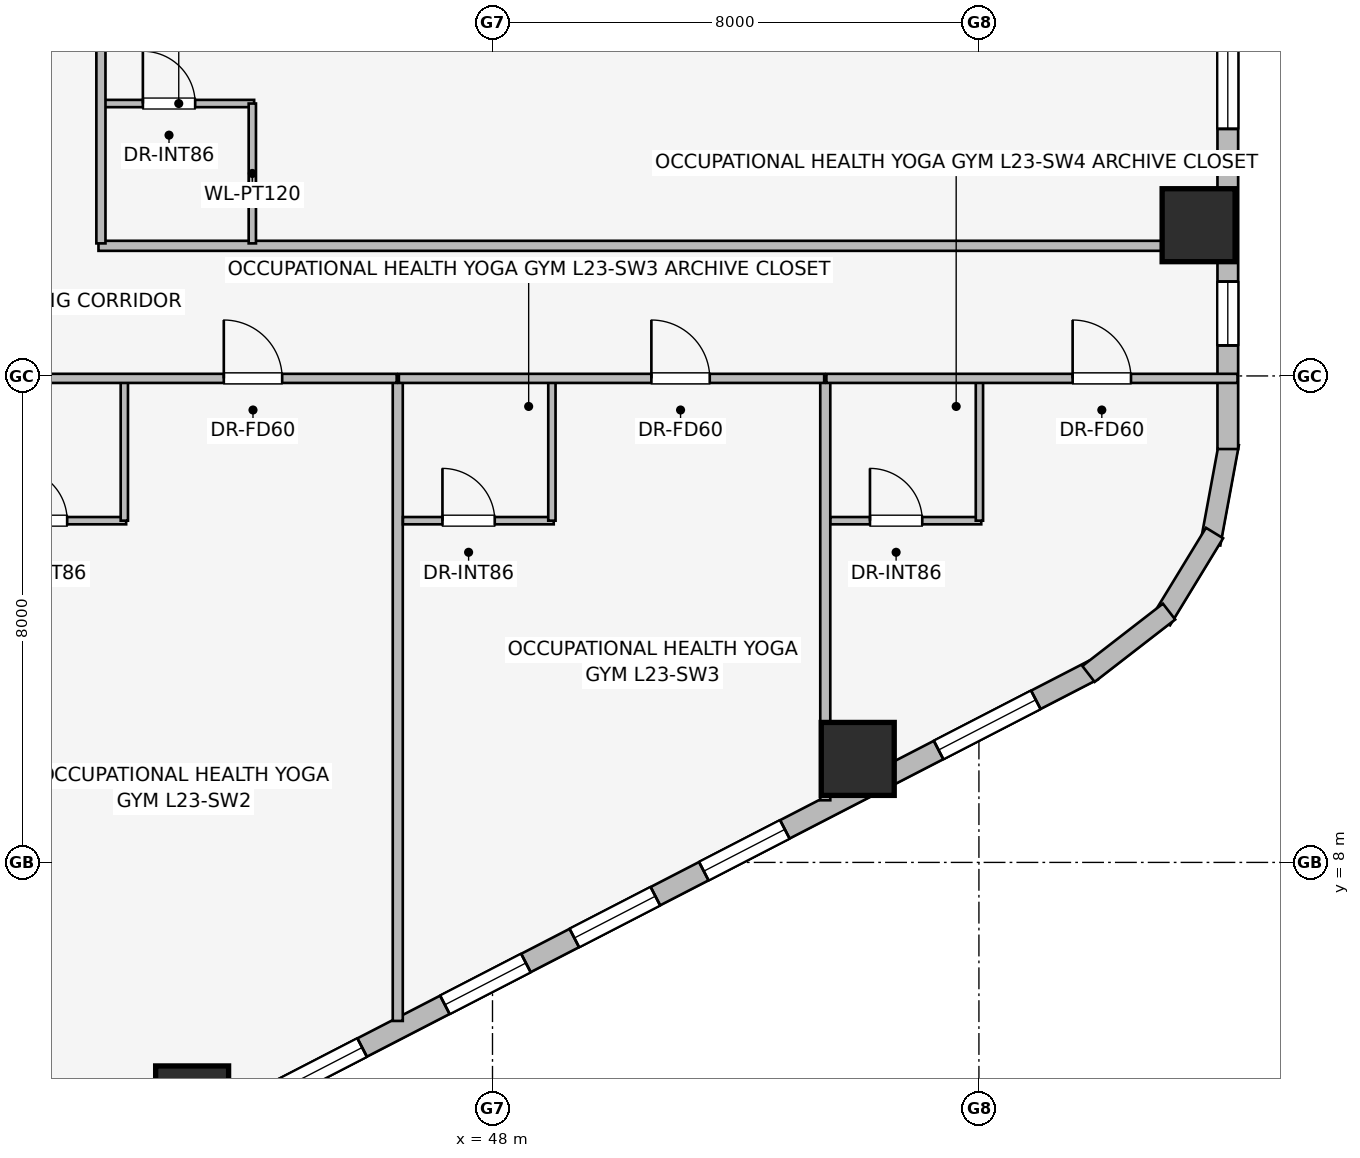
"""IFC4 building model, lengths in metres.
Left out: names, types, materials, properties, quantities, classifications, styles, units other than length and angle.
Written with IfcOpenShell. Run it as: python <this file> out.ifc"""

import sys

from ifc_helpers import new_model, si_unit, direction, frame, frame_2d, origin, origin_2d, place, context, subcontext, project, spatial, rectangle, extrude, element, fill, save


model = new_model("IFC4")
c1 = context("Model", 3, precision=1e-05, world=origin(), true_north=direction((0.0, 1.0)))
c2 = subcontext(c1, "Body", "Model", "MODEL_VIEW")
j1 = project(units=[si_unit("LENGTHUNIT", "METRE"), si_unit("PLANEANGLEUNIT", "RADIAN")], contexts=[c1])
p1 = place(None, origin())
s1 = spatial("IfcSite", under=j1, at=p1, CompositionType="ELEMENT")
p2 = place(p1, origin())
s2 = spatial("IfcBuilding", under=s1, at=p2, CompositionType="ELEMENT")
p3 = place(p2, frame((0.0, 0.0, 89.05)))
s3 = spatial("IfcBuildingStorey", under=s2, at=p3, CompositionType="ELEMENT", Elevation=89.05)
for number, where, z_axis, x_axis in (
    (1, (43.06, 4.053, 0.0), (0.0, 0.0, 1.0), (1.0, 0.0, 0.0)),
    (2, (54.007, 9.702, 0.0), (0.0, 0.0, 1.0), (1.0, 0.0, 0.0)),
    (3, (59.613, 18.479, 0.0), (0.0, 0.0, 1.0), (1.0, 0.0, 0.0)),
):
    element("IfcColumn", number, at=place(p3, frame(where, z_axis=z_axis, x_axis=x_axis)), inside=s3, PredefinedType="COLUMN", context=c2, shape_type="SweptSolid", body=[
        extrude(rectangle(XDim=1.2, YDim=1.2, at=origin_2d()), origin(), (0.0, 0.0, 1.0), 3.65),
    ])
p4 = place(p3, frame((57.876, 11.159, 0.0), z_axis=(0.0, 0.0, 1.0), x_axis=(-0.888634413993, -0.458616264721, 0.0)))
e4 = element("IfcWall", 4, at=p4, inside=s3, PredefinedType="STANDARD", context=c2, shape_type="SweptSolid", body=[
    extrude(rectangle(XDim=20.531, YDim=0.34, at=frame_2d((10.266, 0.0))), origin(), (0.0, 0.0, 1.0), 2.684),
])
p5 = place(p4, frame((1.058, 0.0, 0.75)))
e5 = element("IfcOpeningElement", 5, at=p5, cuts=e4, PredefinedType="OPENING", context=c2, shape_type="SweptSolid", body=[
    extrude(rectangle(XDim=1.8, YDim=1.5, at=frame_2d((0.9, 0.75))), frame((0.0, 0.18, 0.0), z_axis=(0.0, -1.0, 0.0), x_axis=(1.0, 0.0, 0.0)), (0.0, 0.0, 1.0), 0.36),
])
p6 = place(p4, frame((5.703, 0.0, 0.75)))
e6 = element("IfcOpeningElement", 6, at=p6, cuts=e4, PredefinedType="OPENING", context=c2, shape_type="SweptSolid", body=[
    extrude(rectangle(XDim=1.5, YDim=1.5, at=frame_2d((0.75, 0.75))), frame((0.0, 0.18, 0.0), z_axis=(0.0, -1.0, 0.0), x_axis=(1.0, 0.0, 0.0)), (0.0, 0.0, 1.0), 0.36),
])
p7 = place(p4, frame((8.099, 0.0, 0.75)))
e7 = element("IfcOpeningElement", 7, at=p7, cuts=e4, PredefinedType="OPENING", context=c2, shape_type="SweptSolid", body=[
    extrude(rectangle(XDim=1.5, YDim=1.5, at=frame_2d((0.75, 0.75))), frame((0.0, 0.18, 0.0), z_axis=(0.0, -1.0, 0.0), x_axis=(1.0, 0.0, 0.0)), (0.0, 0.0, 1.0), 0.36),
])
p8 = place(p4, frame((10.495, 0.0, 0.75)))
e8 = element("IfcOpeningElement", 8, at=p8, cuts=e4, PredefinedType="OPENING", context=c2, shape_type="SweptSolid", body=[
    extrude(rectangle(XDim=1.5, YDim=1.5, at=frame_2d((0.75, 0.75))), frame((0.0, 0.18, 0.0), z_axis=(0.0, -1.0, 0.0), x_axis=(1.0, 0.0, 0.0)), (0.0, 0.0, 1.0), 0.36),
])
p9 = place(p4, frame((13.526, 0.0, 0.75)))
e9 = element("IfcOpeningElement", 9, at=p9, cuts=e4, PredefinedType="OPENING", context=c2, shape_type="SweptSolid", body=[
    extrude(rectangle(XDim=1.8, YDim=1.5, at=frame_2d((0.9, 0.75))), frame((0.0, 0.18, 0.0), z_axis=(0.0, -1.0, 0.0), x_axis=(1.0, 0.0, 0.0)), (0.0, 0.0, 1.0), 0.36),
])
p10 = place(p4, frame((17.823, 0.0, 0.75)))
e10 = element("IfcOpeningElement", 10, at=p10, cuts=e4, PredefinedType="OPENING", context=c2, shape_type="SweptSolid", body=[
    extrude(rectangle(XDim=1.5, YDim=1.5, at=frame_2d((0.75, 0.75))), frame((0.0, 0.18, 0.0), z_axis=(0.0, -1.0, 0.0), x_axis=(1.0, 0.0, 0.0)), (0.0, 0.0, 1.0), 0.36),
])
p11 = place(p3, frame((60.113, 14.892, 0.0), z_axis=(0.0, 0.0, 1.0), x_axis=(-0.181714143354, -0.983351397063, 0.0)))
e11 = element("IfcWall", 11, at=p11, inside=s3, PredefinedType="STANDARD", context=c2, shape_type="SweptSolid", body=[
    extrude(rectangle(XDim=1.678, YDim=0.33, at=frame_2d((0.839, 0.0))), origin(), (0.0, 0.0, 1.0), 3.39),
])
p12 = place(p3, frame((59.875, 13.417, 0.0), z_axis=(0.0, 0.0, 1.0), x_axis=(-0.520584129191, -0.853810379671, 0.0)))
e12 = element("IfcWall", 12, at=p12, inside=s3, PredefinedType="STANDARD", context=c2, shape_type="SweptSolid", body=[
    extrude(rectangle(XDim=1.677, YDim=0.33, at=frame_2d((0.838, 0.0))), origin(), (0.0, 0.0, 1.0), 3.39),
])
p13 = place(p3, frame((59.127, 12.125, 0.0), z_axis=(0.0, 0.0, 1.0), x_axis=(-0.790691856293, -0.61221433207, 0.0)))
e13 = element("IfcWall", 13, at=p13, inside=s3, PredefinedType="STANDARD", context=c2, shape_type="SweptSolid", body=[
    extrude(rectangle(XDim=1.676, YDim=0.33, at=frame_2d((0.838, 0.0))), origin(), (0.0, 0.0, 1.0), 3.39),
])
p14 = place(p3, frame((60.093, 33.202, 0.0), z_axis=(0.0, 0.0, 1.0), x_axis=(0.0, -1.0, 0.0)))
e14 = element("IfcWall", 14, at=p14, inside=s3, PredefinedType="STANDARD", context=c2, shape_type="SweptSolid", body=[
    extrude(rectangle(XDim=18.404, YDim=0.34, at=frame_2d((9.202, 0.0))), origin(), (0.0, 0.0, 1.0), 2.684),
])
p15 = place(p14, frame((1.744, 0.0, 0.75)))
e15 = element("IfcOpeningElement", 15, at=p15, cuts=e14, PredefinedType="OPENING", context=c2, shape_type="SweptSolid", body=[
    extrude(rectangle(XDim=1.05, YDim=1.4, at=frame_2d((0.525, 0.7))), frame((0.0, 0.18, 0.0), z_axis=(0.0, -1.0, 0.0), x_axis=(1.0, 0.0, 0.0)), (0.0, 0.0, 1.0), 0.36),
])
p16 = place(p14, frame((5.265, 0.0, 0.75)))
e16 = element("IfcOpeningElement", 16, at=p16, cuts=e14, PredefinedType="OPENING", context=c2, shape_type="SweptSolid", body=[
    extrude(rectangle(XDim=1.5, YDim=1.5, at=frame_2d((0.75, 0.75))), frame((0.0, 0.18, 0.0), z_axis=(0.0, -1.0, 0.0), x_axis=(1.0, 0.0, 0.0)), (0.0, 0.0, 1.0), 0.36),
])
p17 = place(p14, frame((8.452, 0.0, 0.75)))
e17 = element("IfcOpeningElement", 17, at=p17, cuts=e14, PredefinedType="OPENING", context=c2, shape_type="SweptSolid", body=[
    extrude(rectangle(XDim=1.5, YDim=1.5, at=frame_2d((0.75, 0.75))), frame((0.0, 0.18, 0.0), z_axis=(0.0, -1.0, 0.0), x_axis=(1.0, 0.0, 0.0)), (0.0, 0.0, 1.0), 0.36),
])
p18 = place(p14, frame((11.639, 0.0, 0.75)))
e18 = element("IfcOpeningElement", 18, at=p18, cuts=e14, PredefinedType="OPENING", context=c2, shape_type="SweptSolid", body=[
    extrude(rectangle(XDim=1.5, YDim=1.5, at=frame_2d((0.75, 0.75))), frame((0.0, 0.18, 0.0), z_axis=(0.0, -1.0, 0.0), x_axis=(1.0, 0.0, 0.0)), (0.0, 0.0, 1.0), 0.36),
])
p19 = place(p14, frame((15.65, 0.0, 0.75)))
e19 = element("IfcOpeningElement", 19, at=p19, cuts=e14, PredefinedType="OPENING", context=c2, shape_type="SweptSolid", body=[
    extrude(rectangle(XDim=1.05, YDim=1.4, at=frame_2d((0.525, 0.7))), frame((0.0, 0.18, 0.0), z_axis=(0.0, -1.0, 0.0), x_axis=(1.0, 0.0, 0.0)), (0.0, 0.0, 1.0), 0.36),
])
p20 = place(p3, frame((41.52, 18.14, 0.0), z_axis=(0.0, 0.0, 1.0), x_axis=(1.0, 0.0, 0.0)))
e20 = element("IfcWall", 20, at=p20, inside=s3, PredefinedType="PARTITIONING", context=c2, shape_type="SweptSolid", body=[
    extrude(rectangle(XDim=18.453, YDim=0.165, at=frame_2d((9.227, 0.0))), origin(), (0.0, 0.0, 1.0), 3.39),
])
p21 = place(p3, frame((41.6, 20.48, 0.0), z_axis=(0.0, 0.0, 1.0), x_axis=(1.0, 0.0, 0.0)))
e21 = element("IfcWall", 21, at=p21, inside=s3, PredefinedType="PARTITIONING", context=c2, shape_type="SweptSolid", body=[
    extrude(rectangle(XDim=2.48, YDim=0.12, at=frame_2d((1.24, 0.0))), origin(), (0.0, 0.0, 1.0), 3.39),
])
p22 = place(p21, frame((0.65, 0.0, 0.0)))
e22 = element("IfcOpeningElement", 22, at=p22, cuts=e21, PredefinedType="OPENING", context=c2, shape_type="SweptSolid", body=[
    extrude(rectangle(XDim=0.86, YDim=2.0, at=frame_2d((0.43, 1.0))), frame((0.0, 0.07, 0.0), z_axis=(0.0, -1.0, 0.0), x_axis=(1.0, 0.0, 0.0)), (0.0, 0.0, 1.0), 0.14),
])
p23 = place(p3, frame((44.05, 18.18, 0.0), z_axis=(0.0, 0.0, 1.0), x_axis=(0.0, 1.0, 0.0)))
e23 = element("IfcWall", 23, at=p23, inside=s3, PredefinedType="PARTITIONING", context=c2, shape_type="SweptSolid", body=[
    extrude(rectangle(XDim=2.3, YDim=0.12, at=frame_2d((1.15, 0.0))), origin(), (0.0, 0.0, 1.0), 3.39),
])
p24 = place(p3, frame((41.56, 18.18, 0.0), z_axis=(0.0, 0.0, 1.0), x_axis=(0.0, 1.0, 0.0)))
e24 = element("IfcWall", 24, at=p24, inside=s3, PredefinedType="PARTITIONING", context=c2, shape_type="SweptSolid", body=[
    extrude(rectangle(XDim=11.64, YDim=0.15, at=frame_2d((5.82, 0.0))), origin(), (0.0, 0.0, 1.0), 3.39),
])
p25 = place(p24, frame((6.615, 0.0, 0.0)))
e25 = element("IfcOpeningElement", 25, at=p25, cuts=e24, PredefinedType="OPENING", context=c2, shape_type="SweptSolid", body=[
    extrude(rectangle(XDim=0.96, YDim=2.0, at=frame_2d((0.48, 1.0))), frame((0.0, 0.085, 0.0), z_axis=(0.0, -1.0, 0.0), x_axis=(1.0, 0.0, 0.0)), (0.0, 0.0, 1.0), 0.17),
])
p26 = place(p3, frame((46.442, 5.393, 0.0), z_axis=(0.0, 0.0, 1.0), x_axis=(0.0, 1.0, 0.0)))
e26 = element("IfcWall", 26, at=p26, inside=s3, PredefinedType="PARTITIONING", context=c2, shape_type="SweptSolid", body=[
    extrude(rectangle(XDim=10.537, YDim=0.165, at=frame_2d((5.269, 0.0))), origin(), (0.0, 0.0, 1.0), 3.39),
])
p27 = place(p3, frame((53.473, 9.022, 0.0), z_axis=(0.0, 0.0, 1.0), x_axis=(0.0, 1.0, 0.0)))
e27 = element("IfcWall", 27, at=p27, inside=s3, PredefinedType="PARTITIONING", context=c2, shape_type="SweptSolid", body=[
    extrude(rectangle(XDim=6.908, YDim=0.165, at=frame_2d((3.454, 0.0))), origin(), (0.0, 0.0, 1.0), 3.39),
])
p28 = place(p3, frame((39.495, 13.62, 0.0), z_axis=(0.0, 0.0, 1.0), x_axis=(1.0, 0.0, 0.0)))
e28 = element("IfcWall", 28, at=p28, inside=s3, PredefinedType="PARTITIONING", context=c2, shape_type="SweptSolid", body=[
    extrude(rectangle(XDim=2.48, YDim=0.12, at=frame_2d((1.24, 0.0))), origin(), (0.0, 0.0, 1.0), 3.39),
])
p29 = place(p28, frame((0.65, 0.0, 0.0)))
e29 = element("IfcOpeningElement", 29, at=p29, cuts=e28, PredefinedType="OPENING", context=c2, shape_type="SweptSolid", body=[
    extrude(rectangle(XDim=0.86, YDim=2.0, at=frame_2d((0.43, 1.0))), frame((0.0, 0.07, 0.0), z_axis=(0.0, -1.0, 0.0), x_axis=(1.0, 0.0, 0.0)), (0.0, 0.0, 1.0), 0.14),
])
p30 = place(p3, frame((41.945, 13.62, 0.0), z_axis=(0.0, 0.0, 1.0), x_axis=(0.0, 1.0, 0.0)))
e30 = element("IfcWall", 30, at=p30, inside=s3, PredefinedType="PARTITIONING", context=c2, shape_type="SweptSolid", body=[
    extrude(rectangle(XDim=2.3, YDim=0.12, at=frame_2d((1.15, 0.0))), origin(), (0.0, 0.0, 1.0), 3.39),
])
p31 = place(p3, frame((39.428, 15.96, 0.0), z_axis=(0.0, 0.0, 1.0), x_axis=(1.0, 0.0, 0.0)))
e31 = element("IfcWall", 31, at=p31, inside=s3, PredefinedType="PARTITIONING", context=c2, shape_type="SweptSolid", body=[
    extrude(rectangle(XDim=6.996, YDim=0.15, at=frame_2d((3.498, 0.0))), origin(), (0.0, 0.0, 1.0), 3.39),
])
p32 = place(p31, frame((4.153, 0.0, 0.0)))
e32 = element("IfcOpeningElement", 32, at=p32, cuts=e31, PredefinedType="OPENING", context=c2, shape_type="SweptSolid", body=[
    extrude(rectangle(XDim=0.96, YDim=2.0, at=frame_2d((0.48, 1.0))), frame((0.0, 0.085, 0.0), z_axis=(0.0, -1.0, 0.0), x_axis=(1.0, 0.0, 0.0)), (0.0, 0.0, 1.0), 0.17),
])
p33 = place(p3, frame((46.527, 13.62, 0.0), z_axis=(0.0, 0.0, 1.0), x_axis=(1.0, 0.0, 0.0)))
e33 = element("IfcWall", 33, at=p33, inside=s3, PredefinedType="PARTITIONING", context=c2, shape_type="SweptSolid", body=[
    extrude(rectangle(XDim=2.48, YDim=0.12, at=frame_2d((1.24, 0.0))), origin(), (0.0, 0.0, 1.0), 3.39),
])
p34 = place(p33, frame((0.65, 0.0, 0.0)))
e34 = element("IfcOpeningElement", 34, at=p34, cuts=e33, PredefinedType="OPENING", context=c2, shape_type="SweptSolid", body=[
    extrude(rectangle(XDim=0.86, YDim=2.0, at=frame_2d((0.43, 1.0))), frame((0.0, 0.07, 0.0), z_axis=(0.0, -1.0, 0.0), x_axis=(1.0, 0.0, 0.0)), (0.0, 0.0, 1.0), 0.14),
])
p35 = place(p3, frame((48.977, 13.62, 0.0), z_axis=(0.0, 0.0, 1.0), x_axis=(0.0, 1.0, 0.0)))
e35 = element("IfcWall", 35, at=p35, inside=s3, PredefinedType="PARTITIONING", context=c2, shape_type="SweptSolid", body=[
    extrude(rectangle(XDim=2.3, YDim=0.12, at=frame_2d((1.15, 0.0))), origin(), (0.0, 0.0, 1.0), 3.39),
])
p36 = place(p3, frame((46.46, 15.96, 0.0), z_axis=(0.0, 0.0, 1.0), x_axis=(1.0, 0.0, 0.0)))
e36 = element("IfcWall", 36, at=p36, inside=s3, PredefinedType="PARTITIONING", context=c2, shape_type="SweptSolid", body=[
    extrude(rectangle(XDim=6.995, YDim=0.15, at=frame_2d((3.498, 0.0))), origin(), (0.0, 0.0, 1.0), 3.39),
])
p37 = place(p36, frame((4.153, 0.0, 0.0)))
e37 = element("IfcOpeningElement", 37, at=p37, cuts=e36, PredefinedType="OPENING", context=c2, shape_type="SweptSolid", body=[
    extrude(rectangle(XDim=0.96, YDim=2.0, at=frame_2d((0.48, 1.0))), frame((0.0, 0.085, 0.0), z_axis=(0.0, -1.0, 0.0), x_axis=(1.0, 0.0, 0.0)), (0.0, 0.0, 1.0), 0.17),
])
p38 = place(p3, frame((53.558, 13.62, 0.0), z_axis=(0.0, 0.0, 1.0), x_axis=(1.0, 0.0, 0.0)))
e38 = element("IfcWall", 38, at=p38, inside=s3, PredefinedType="PARTITIONING", context=c2, shape_type="SweptSolid", body=[
    extrude(rectangle(XDim=2.48, YDim=0.12, at=frame_2d((1.24, 0.0))), origin(), (0.0, 0.0, 1.0), 3.39),
])
p39 = place(p38, frame((0.65, 0.0, 0.0)))
e39 = element("IfcOpeningElement", 39, at=p39, cuts=e38, PredefinedType="OPENING", context=c2, shape_type="SweptSolid", body=[
    extrude(rectangle(XDim=0.86, YDim=2.0, at=frame_2d((0.43, 1.0))), frame((0.0, 0.07, 0.0), z_axis=(0.0, -1.0, 0.0), x_axis=(1.0, 0.0, 0.0)), (0.0, 0.0, 1.0), 0.14),
])
p40 = place(p3, frame((56.008, 13.62, 0.0), z_axis=(0.0, 0.0, 1.0), x_axis=(0.0, 1.0, 0.0)))
e40 = element("IfcWall", 40, at=p40, inside=s3, PredefinedType="PARTITIONING", context=c2, shape_type="SweptSolid", body=[
    extrude(rectangle(XDim=2.3, YDim=0.12, at=frame_2d((1.15, 0.0))), origin(), (0.0, 0.0, 1.0), 3.39),
])
p41 = place(p3, frame((53.491, 15.96, 0.0), z_axis=(0.0, 0.0, 1.0), x_axis=(1.0, 0.0, 0.0)))
e41 = element("IfcWall", 41, at=p41, inside=s3, PredefinedType="PARTITIONING", context=c2, shape_type="SweptSolid", body=[
    extrude(rectangle(XDim=6.762, YDim=0.15, at=frame_2d((3.381, 0.0))), origin(), (0.0, 0.0, 1.0), 3.39),
])
p42 = place(p41, frame((4.05, 0.0, 0.0)))
e42 = element("IfcOpeningElement", 42, at=p42, cuts=e41, PredefinedType="OPENING", context=c2, shape_type="SweptSolid", body=[
    extrude(rectangle(XDim=0.96, YDim=2.0, at=frame_2d((0.48, 1.0))), frame((0.0, 0.085, 0.0), z_axis=(0.0, -1.0, 0.0), x_axis=(1.0, 0.0, 0.0)), (0.0, 0.0, 1.0), 0.17),
])
p43 = place(p5, origin())
e43 = element("IfcWindow", 43, at=p43, inside=s3, PartitioningType="SINGLE_PANEL", PredefinedType="WINDOW", context=c2, shape_type="SweptSolid", body=[
    extrude(rectangle(XDim=1.8, YDim=1.5, at=frame_2d((0.9, 0.75))), frame((0.0, 0.03, 0.0), z_axis=(0.0, -1.0, 0.0), x_axis=(1.0, 0.0, 0.0)), (0.0, 0.0, 1.0), 0.06),
])
fill(e5, e43)
p44 = place(p6, origin())
e44 = element("IfcWindow", 44, at=p44, inside=s3, PartitioningType="SINGLE_PANEL", PredefinedType="WINDOW", context=c2, shape_type="SweptSolid", body=[
    extrude(rectangle(XDim=1.5, YDim=1.5, at=frame_2d((0.75, 0.75))), frame((0.0, 0.03, 0.0), z_axis=(0.0, -1.0, 0.0), x_axis=(1.0, 0.0, 0.0)), (0.0, 0.0, 1.0), 0.06),
])
fill(e6, e44)
p45 = place(p7, origin())
e45 = element("IfcWindow", 45, at=p45, inside=s3, PartitioningType="SINGLE_PANEL", PredefinedType="WINDOW", context=c2, shape_type="SweptSolid", body=[
    extrude(rectangle(XDim=1.5, YDim=1.5, at=frame_2d((0.75, 0.75))), frame((0.0, 0.03, 0.0), z_axis=(0.0, -1.0, 0.0), x_axis=(1.0, 0.0, 0.0)), (0.0, 0.0, 1.0), 0.06),
])
fill(e7, e45)
p46 = place(p8, origin())
e46 = element("IfcWindow", 46, at=p46, inside=s3, PartitioningType="SINGLE_PANEL", PredefinedType="WINDOW", context=c2, shape_type="SweptSolid", body=[
    extrude(rectangle(XDim=1.5, YDim=1.5, at=frame_2d((0.75, 0.75))), frame((0.0, 0.03, 0.0), z_axis=(0.0, -1.0, 0.0), x_axis=(1.0, 0.0, 0.0)), (0.0, 0.0, 1.0), 0.06),
])
fill(e8, e46)
p47 = place(p9, origin())
e47 = element("IfcWindow", 47, at=p47, inside=s3, PartitioningType="SINGLE_PANEL", PredefinedType="WINDOW", context=c2, shape_type="SweptSolid", body=[
    extrude(rectangle(XDim=1.8, YDim=1.5, at=frame_2d((0.9, 0.75))), frame((0.0, 0.03, 0.0), z_axis=(0.0, -1.0, 0.0), x_axis=(1.0, 0.0, 0.0)), (0.0, 0.0, 1.0), 0.06),
])
fill(e9, e47)
p48 = place(p18, origin())
e48 = element("IfcWindow", 48, at=p48, inside=s3, PartitioningType="SINGLE_PANEL", PredefinedType="WINDOW", context=c2, shape_type="SweptSolid", body=[
    extrude(rectangle(XDim=1.5, YDim=1.5, at=frame_2d((0.75, 0.75))), frame((0.0, 0.03, 0.0), z_axis=(0.0, -1.0, 0.0), x_axis=(1.0, 0.0, 0.0)), (0.0, 0.0, 1.0), 0.06),
])
fill(e18, e48)
p49 = place(p19, origin())
e49 = element("IfcWindow", 49, at=p49, inside=s3, PartitioningType="SINGLE_PANEL", PredefinedType="WINDOW", context=c2, shape_type="SweptSolid", body=[
    extrude(rectangle(XDim=1.05, YDim=1.4, at=frame_2d((0.525, 0.7))), frame((0.0, 0.03, 0.0), z_axis=(0.0, -1.0, 0.0), x_axis=(1.0, 0.0, 0.0)), (0.0, 0.0, 1.0), 0.06),
])
fill(e19, e49)
p50 = place(p22, origin())
e50 = element("IfcDoor", 50, at=p50, inside=s3, OperationType="SINGLE_SWING_LEFT", PredefinedType="DOOR", context=c2, shape_type="SweptSolid", body=[
    extrude(rectangle(XDim=0.86, YDim=2.0, at=frame_2d((0.43, 1.0))), frame((0.0, 0.025, 0.0), z_axis=(0.0, -1.0, 0.0), x_axis=(1.0, 0.0, 0.0)), (0.0, 0.0, 1.0), 0.05),
])
fill(e22, e50)
p51 = place(p29, origin())
e51 = element("IfcDoor", 51, at=p51, inside=s3, OperationType="SINGLE_SWING_LEFT", PredefinedType="DOOR", context=c2, shape_type="SweptSolid", body=[
    extrude(rectangle(XDim=0.86, YDim=2.0, at=frame_2d((0.43, 1.0))), frame((0.0, 0.025, 0.0), z_axis=(0.0, -1.0, 0.0), x_axis=(1.0, 0.0, 0.0)), (0.0, 0.0, 1.0), 0.05),
])
fill(e29, e51)
p52 = place(p32, origin())
e52 = element("IfcDoor", 52, at=p52, inside=s3, OperationType="SINGLE_SWING_LEFT", PredefinedType="DOOR", context=c2, shape_type="SweptSolid", body=[
    extrude(rectangle(XDim=0.96, YDim=2.0, at=frame_2d((0.48, 1.0))), frame((0.0, 0.025, 0.0), z_axis=(0.0, -1.0, 0.0), x_axis=(1.0, 0.0, 0.0)), (0.0, 0.0, 1.0), 0.05),
])
fill(e32, e52)
p53 = place(p34, origin())
e53 = element("IfcDoor", 53, at=p53, inside=s3, OperationType="SINGLE_SWING_LEFT", PredefinedType="DOOR", context=c2, shape_type="SweptSolid", body=[
    extrude(rectangle(XDim=0.86, YDim=2.0, at=frame_2d((0.43, 1.0))), frame((0.0, 0.025, 0.0), z_axis=(0.0, -1.0, 0.0), x_axis=(1.0, 0.0, 0.0)), (0.0, 0.0, 1.0), 0.05),
])
fill(e34, e53)
p54 = place(p37, origin())
e54 = element("IfcDoor", 54, at=p54, inside=s3, OperationType="SINGLE_SWING_LEFT", PredefinedType="DOOR", context=c2, shape_type="SweptSolid", body=[
    extrude(rectangle(XDim=0.96, YDim=2.0, at=frame_2d((0.48, 1.0))), frame((0.0, 0.025, 0.0), z_axis=(0.0, -1.0, 0.0), x_axis=(1.0, 0.0, 0.0)), (0.0, 0.0, 1.0), 0.05),
])
fill(e37, e54)
p55 = place(p39, origin())
e55 = element("IfcDoor", 55, at=p55, inside=s3, OperationType="SINGLE_SWING_LEFT", PredefinedType="DOOR", context=c2, shape_type="SweptSolid", body=[
    extrude(rectangle(XDim=0.86, YDim=2.0, at=frame_2d((0.43, 1.0))), frame((0.0, 0.025, 0.0), z_axis=(0.0, -1.0, 0.0), x_axis=(1.0, 0.0, 0.0)), (0.0, 0.0, 1.0), 0.05),
])
fill(e39, e55)
p56 = place(p42, origin())
e56 = element("IfcDoor", 56, at=p56, inside=s3, OperationType="SINGLE_SWING_LEFT", PredefinedType="DOOR", context=c2, shape_type="SweptSolid", body=[
    extrude(rectangle(XDim=0.96, YDim=2.0, at=frame_2d((0.48, 1.0))), frame((0.0, 0.025, 0.0), z_axis=(0.0, -1.0, 0.0), x_axis=(1.0, 0.0, 0.0)), (0.0, 0.0, 1.0), 0.05),
])
fill(e42, e56)
save(model, sys.argv[1])
